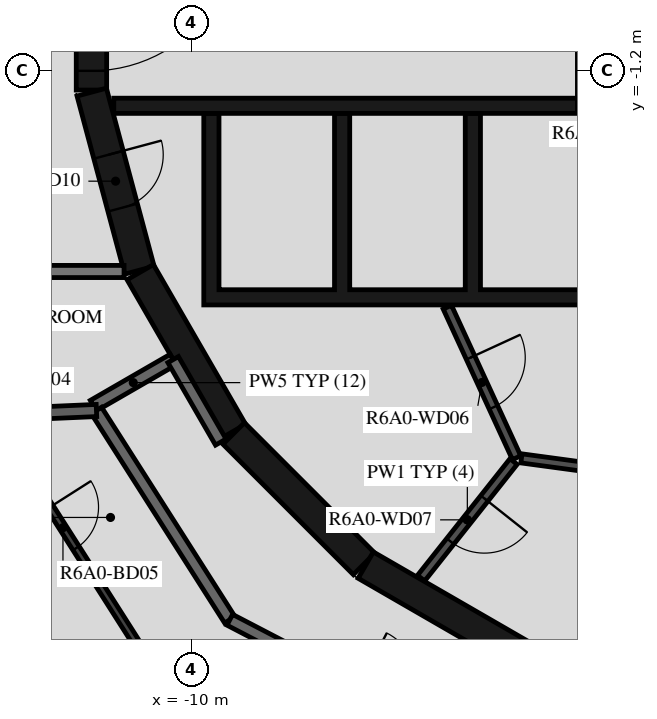
"""IFC4 building model, lengths in metres.
Left out: names, types, materials, properties, quantities, classifications, styles, units other than length and angle.
Written with IfcOpenShell. Run it as: python <this file> out.ifc"""

import sys

from ifc_helpers import new_model, si_unit, direction, frame, frame_2d, origin, place, context, subcontext, project, spatial, polyline, rectangle, outline, extrude, element, fill, save


model = new_model("IFC4")
c1 = context("Model", 3, precision=1e-05, world=origin(), true_north=direction((0.0, 1.0)))
c2 = subcontext(c1, "Body", "Model", "MODEL_VIEW")
j1 = project(units=[si_unit("LENGTHUNIT", "METRE"), si_unit("PLANEANGLEUNIT", "RADIAN")], contexts=[c1])
p1 = place(None, origin())
s1 = spatial("IfcSite", under=j1, at=p1, CompositionType="ELEMENT")
p2 = place(p1, origin())
s2 = spatial("IfcBuilding", under=s1, at=p2, CompositionType="ELEMENT")
p3 = place(p2, frame((0.0, 0.0, 226.7)))
s3 = spatial("IfcBuildingStorey", under=s2, at=p3, CompositionType="ELEMENT", Elevation=226.7)
p4 = place(p3, frame((-11.647, 1.516, 0.0), z_axis=(0.0, 0.0, 1.0), x_axis=(0.0, -1.0, 0.0)))
e1 = element("IfcWall", 1, at=p4, inside=s3, PredefinedType="SHEAR", context=c2, shape_type="SweptSolid", body=[
    extrude(rectangle(XDim=3.033, YDim=0.5, at=frame_2d((1.516, 0.0))), origin(), (0.0, 0.0, 1.0), 3.12),
])
p5 = place(p4, frame((0.316, 0.0, 0.0)))
e2 = element("IfcOpeningElement", 2, at=p5, cuts=e1, PredefinedType="OPENING", context=c2, shape_type="SweptSolid", body=[
    extrude(rectangle(XDim=2.4, YDim=2.1, at=frame_2d((1.2, 1.05))), frame((0.0, 0.26, 0.0), z_axis=(0.0, -1.0, 0.0), x_axis=(1.0, 0.0, 0.0)), (0.0, 0.0, 1.0), 0.52),
])
p6 = place(p3, frame((-11.643, -1.55, 0.0), z_axis=(0.0, 0.0, 1.0), x_axis=(0.258734743916, -0.965948410781, 0.0)))
e3 = element("IfcWall", 3, at=p6, inside=s3, PredefinedType="SHEAR", context=c2, shape_type="SweptSolid", body=[
    extrude(rectangle(XDim=3.033, YDim=0.5, at=frame_2d((1.516, 0.0))), origin(), (0.0, 0.0, 1.0), 3.12),
])
p7 = place(p6, frame((1.066, 0.0, 0.0)))
e4 = element("IfcOpeningElement", 4, at=p7, cuts=e3, PredefinedType="OPENING", context=c2, shape_type="SweptSolid", body=[
    extrude(rectangle(XDim=0.9, YDim=2.1, at=frame_2d((0.45, 1.05))), frame((0.0, 0.26, 0.0), z_axis=(0.0, -1.0, 0.0), x_axis=(1.0, 0.0, 0.0)), (0.0, 0.0, 1.0), 0.52),
])
p8 = place(p3, frame((-10.845, -4.51, 0.0), z_axis=(0.0, 0.0, 1.0), x_axis=(0.500087131594, -0.865975092491, 0.0)))
e5 = element("IfcWall", 5, at=p8, inside=s3, PredefinedType="SHEAR", context=c2, shape_type="SweptSolid", body=[
    extrude(rectangle(XDim=3.033, YDim=0.5, at=frame_2d((1.516, 0.0))), origin(), (0.0, 0.0, 1.0), 3.12),
])
p9 = place(p3, frame((-9.308, -7.164, 0.0), z_axis=(0.0, 0.0, 1.0), x_axis=(0.707106781187, -0.707106781187, 0.0)))
e6 = element("IfcWall", 6, at=p9, inside=s3, PredefinedType="SHEAR", context=c2, shape_type="SweptSolid", body=[
    extrude(rectangle(XDim=3.032, YDim=0.5, at=frame_2d((1.516, 0.0))), origin(), (0.0, 0.0, 1.0), 3.12),
])
p10 = place(p3, frame((-7.137, -9.329, 0.0), z_axis=(0.0, 0.0, 1.0), x_axis=(0.865975092491, -0.500087131594, 0.0)))
e7 = element("IfcWall", 7, at=p10, inside=s3, PredefinedType="SHEAR", context=c2, shape_type="SweptSolid", body=[
    extrude(rectangle(XDim=3.033, YDim=0.5, at=frame_2d((1.516, 0.0))), origin(), (0.0, 0.0, 1.0), 3.12),
])
p11 = place(p3, origin())
e8 = element("IfcWall", 8, at=p11, inside=s3, PredefinedType="SHEAR", context=c2, shape_type="SweptSolid", body=[
    extrude(outline(polyline([(9.8, -5.05), (9.8, -4.8), (9.8, -1.9), (9.55, -1.9), (9.55, -4.8), (7.65, -4.8), (7.65, -1.9), (7.4, -1.9), (7.4, -4.8), (5.5, -4.8), (5.5, -1.9), (5.25, -1.9), (5.25, -4.8), (3.35, -4.8), (3.35, -1.9), (3.1, -1.9), (3.1, -4.8), (1.2, -4.8), (1.2, -1.9), (0.95, -1.9), (0.95, -4.8), (-0.95, -4.8), (-0.95, -1.9), (-1.2, -1.9), (-1.2, -4.8), (-5.25, -4.8), (-5.25, -1.9), (-5.5, -1.9), (-5.5, -4.8), (-7.4, -4.8), (-7.4, -1.9), (-7.65, -1.9), (-7.65, -4.8), (-9.55, -4.8), (-9.55, -1.9), (-9.8, -1.9), (-9.8, -4.8), (-9.8, -5.05), (9.8, -5.05)])), origin(), (0.0, 0.0, 1.0), 3.12),
])
p12 = place(p3, frame((-11.28, -1.775, 0.0), z_axis=(0.0, 0.0, 1.0), x_axis=(1.0, 0.0, 0.0)))
e9 = element("IfcWall", 9, at=p12, inside=s3, PredefinedType="SHEAR", context=c2, shape_type="SweptSolid", body=[
    extrude(rectangle(XDim=14.38, YDim=0.25, at=frame_2d((7.19, 0.0))), origin(), (0.0, 0.0, 1.0), 3.12),
])
p13 = place(p12, frame((12.88, 0.0, 0.0)))
e10 = element("IfcOpeningElement", 10, at=p13, cuts=e9, PredefinedType="OPENING", context=c2, shape_type="SweptSolid", body=[
    extrude(rectangle(XDim=1.1, YDim=2.1, at=frame_2d((0.55, 1.05))), frame((0.0, 0.135, 0.0), z_axis=(0.0, -1.0, 0.0), x_axis=(1.0, 0.0, 0.0)), (0.0, 0.0, 1.0), 0.27),
])
p14 = place(p12, frame((7.605, 0.0, 0.0)))
e11 = element("IfcOpeningElement", 11, at=p14, cuts=e9, PredefinedType="OPENING", context=c2, shape_type="SweptSolid", body=[
    extrude(rectangle(XDim=0.9, YDim=2.1, at=frame_2d((0.45, 1.05))), frame((0.0, 0.135, 0.0), z_axis=(0.0, -1.0, 0.0), x_axis=(1.0, 0.0, 0.0)), (0.0, 0.0, 1.0), 0.27),
])
p15 = place(p12, frame((10.83, 0.0, 0.0)))
e12 = element("IfcOpeningElement", 12, at=p15, cuts=e9, PredefinedType="OPENING", context=c2, shape_type="SweptSolid", body=[
    extrude(rectangle(XDim=0.9, YDim=2.1, at=frame_2d((0.45, 1.05))), frame((0.0, 0.135, 0.0), z_axis=(0.0, -1.0, 0.0), x_axis=(1.0, 0.0, 0.0)), (0.0, 0.0, 1.0), 0.27),
])
p16 = place(p3, frame((-5.795, -5.086, 0.0), z_axis=(0.0, 0.0, 1.0), x_axis=(0.417887867606, -0.908498613157, 0.0)))
e13 = element("IfcWall", 13, at=p16, inside=s3, PredefinedType="PARTITIONING", context=c2, shape_type="SweptSolid", body=[
    extrude(rectangle(XDim=2.726, YDim=0.15, at=frame_2d((1.363, 0.0))), origin(), (0.0, 0.0, 1.0), 3.12),
])
p17 = place(p16, frame((0.913, 0.0, 0.0)))
e14 = element("IfcOpeningElement", 14, at=p17, cuts=e13, PredefinedType="OPENING", context=c2, shape_type="SweptSolid", body=[
    extrude(rectangle(XDim=0.9, YDim=2.1, at=frame_2d((0.45, 1.05))), frame((0.0, 0.085, 0.0), z_axis=(0.0, -1.0, 0.0), x_axis=(1.0, 0.0, 0.0)), (0.0, 0.0, 1.0), 0.17),
])
p18 = place(p3, frame((-4.706, -7.625, 0.0), z_axis=(0.0, 0.0, 1.0), x_axis=(-0.621392599334, -0.783499353856, 0.0)))
e15 = element("IfcWall", 15, at=p18, inside=s3, PredefinedType="PARTITIONING", context=c2, shape_type="SweptSolid", body=[
    extrude(rectangle(XDim=2.447, YDim=0.15, at=frame_2d((1.224, 0.0))), origin(), (0.0, 0.0, 1.0), 3.12),
])
p19 = place(p18, frame((0.774, 0.0, 0.0)))
e16 = element("IfcOpeningElement", 16, at=p19, cuts=e15, PredefinedType="OPENING", context=c2, shape_type="SweptSolid", body=[
    extrude(rectangle(XDim=0.9, YDim=2.1, at=frame_2d((0.45, 1.05))), frame((0.0, 0.085, 0.0), z_axis=(0.0, -1.0, 0.0), x_axis=(1.0, 0.0, 0.0)), (0.0, 0.0, 1.0), 0.17),
])
p20 = place(p3, frame((-2.42, -7.865, 0.0), z_axis=(0.0, 0.0, 1.0), x_axis=(-0.990972299108, 0.134066783362, 0.0)))
e17 = element("IfcWall", 17, at=p20, inside=s3, PredefinedType="PARTITIONING", context=c2, shape_type="SweptSolid", body=[
    extrude(rectangle(XDim=2.176, YDim=0.15, at=frame_2d((1.088, 0.0))), origin(), (0.0, 0.0, 1.0), 3.12),
])
p21 = place(p3, frame((-10.303, -5.949, 0.0), z_axis=(0.0, 0.0, 1.0), x_axis=(-0.866043382451, -0.499968858743, 0.0)))
e18 = element("IfcWall", 18, at=p21, inside=s3, PredefinedType="STANDARD", context=c2, shape_type="SweptSolid", body=[
    extrude(rectangle(XDim=1.515, YDim=0.2, at=frame_2d((0.758, 0.0))), origin(), (0.0, 0.0, 1.0), 3.12),
])
p22 = place(p3, frame((-9.52, -7.305, 0.0), z_axis=(0.0, 0.0, 1.0), x_axis=(-0.500028278809, 0.866009076391, 0.0)))
e19 = element("IfcWall", 19, at=p22, inside=s3, PredefinedType="STANDARD", context=c2, shape_type="SweptSolid", body=[
    extrude(rectangle(XDim=1.566, YDim=0.2, at=frame_2d((0.783, 0.0))), origin(), (0.0, 0.0, 1.0), 3.12),
])
p23 = place(p3, frame((-11.565, -6.786, 0.0), z_axis=(0.0, 0.0, 1.0), x_axis=(0.537297327359, -0.843392898958, 0.0)))
e20 = element("IfcWall", 20, at=p23, inside=s3, PredefinedType="STANDARD", context=c2, shape_type="SweptSolid", body=[
    extrude(rectangle(XDim=4.081, YDim=0.2, at=frame_2d((2.041, 0.0))), origin(), (0.0, 0.0, 1.0), 3.12),
])
p24 = place(p3, frame((-9.372, -10.228, 0.0), z_axis=(0.0, 0.0, 1.0), x_axis=(0.887005184532, -0.461759464021, 0.0)))
e21 = element("IfcWall", 21, at=p24, inside=s3, PredefinedType="STANDARD", context=c2, shape_type="SweptSolid", body=[
    extrude(rectangle(XDim=7.181, YDim=0.2, at=frame_2d((3.591, 0.0))), origin(), (0.0, 0.0, 1.0), 3.12),
])
p25 = place(p24, frame((2.391, 0.0, 0.0)))
e22 = element("IfcOpeningElement", 22, at=p25, cuts=e21, PredefinedType="OPENING", context=c2, shape_type="SweptSolid", body=[
    extrude(rectangle(XDim=1.0, YDim=2.1, at=frame_2d((0.5, 1.05))), frame((0.0, 0.11, 0.0), z_axis=(0.0, -1.0, 0.0), x_axis=(1.0, 0.0, 0.0)), (0.0, 0.0, 1.0), 0.22),
])
p26 = place(p3, frame((-17.655, -4.5, 0.0), z_axis=(0.0, 0.0, 1.0), x_axis=(1.0, 0.0, 0.0)))
e23 = element("IfcWall", 23, at=p26, inside=s3, PredefinedType="STANDARD", context=c2, shape_type="SweptSolid", body=[
    extrude(rectangle(XDim=6.543, YDim=0.2, at=frame_2d((3.272, 0.0))), origin(), (0.0, 0.0, 1.0), 3.12),
])
p27 = place(p3, frame((-13.148, -6.855, 0.0), z_axis=(0.0, 0.0, 1.0), x_axis=(0.999048583464, 0.043611098121, 0.0)))
e24 = element("IfcWall", 24, at=p27, inside=s3, PredefinedType="STANDARD", context=c2, shape_type="SweptSolid", body=[
    extrude(rectangle(XDim=1.584, YDim=0.2, at=frame_2d((0.792, 0.0))), origin(), (0.0, 0.0, 1.0), 3.12),
])
p28 = place(p3, frame((-13.137, -7.111, 0.0), z_axis=(0.0, 0.0, 1.0), x_axis=(0.537300549444, -0.843390846267, 0.0)))
e25 = element("IfcWall", 25, at=p28, inside=s3, PredefinedType="PARTITIONING", context=c2, shape_type="SweptSolid", body=[
    extrude(rectangle(XDim=5.054, YDim=0.12, at=frame_2d((2.527, 0.0))), origin(), (0.0, 0.0, 1.0), 3.12),
])
p29 = place(p28, frame((1.5, 0.0, 0.0)))
e26 = element("IfcOpeningElement", 26, at=p29, cuts=e25, PredefinedType="OPENING", context=c2, shape_type="SweptSolid", body=[
    extrude(rectangle(XDim=0.8, YDim=2.1, at=frame_2d((0.4, 1.05))), frame((0.0, 0.07, 0.0), z_axis=(0.0, -1.0, 0.0), x_axis=(1.0, 0.0, 0.0)), (0.0, 0.0, 1.0), 0.14),
])
p30 = place(p5, origin())
e27 = element("IfcDoor", 27, at=p30, inside=s3, OperationType="DOUBLE_DOOR_SINGLE_SWING", PredefinedType="DOOR", context=c2, shape_type="SweptSolid", body=[
    extrude(rectangle(XDim=2.4, YDim=2.1, at=frame_2d((1.2, 1.05))), frame((0.0, 0.025, 0.0), z_axis=(0.0, -1.0, 0.0), x_axis=(1.0, 0.0, 0.0)), (0.0, 0.0, 1.0), 0.05),
])
fill(e2, e27)
p31 = place(p14, origin())
e28 = element("IfcDoor", 28, at=p31, inside=s3, OperationType="SINGLE_SWING_RIGHT", PredefinedType="DOOR", context=c2, shape_type="SweptSolid", body=[
    extrude(rectangle(XDim=0.9, YDim=2.1, at=frame_2d((0.45, 1.05))), frame((0.0, 0.025, 0.0), z_axis=(0.0, -1.0, 0.0), x_axis=(1.0, 0.0, 0.0)), (0.0, 0.0, 1.0), 0.05),
])
fill(e11, e28)
p32 = place(p17, origin())
e29 = element("IfcDoor", 29, at=p32, inside=s3, OperationType="SINGLE_SWING_RIGHT", PredefinedType="DOOR", context=c2, shape_type="SweptSolid", body=[
    extrude(rectangle(XDim=0.9, YDim=2.1, at=frame_2d((0.45, 1.05))), frame((0.0, 0.025, 0.0), z_axis=(0.0, -1.0, 0.0), x_axis=(1.0, 0.0, 0.0)), (0.0, 0.0, 1.0), 0.05),
])
fill(e14, e29)
p33 = place(p19, origin())
e30 = element("IfcDoor", 30, at=p33, inside=s3, OperationType="SINGLE_SWING_LEFT", PredefinedType="DOOR", context=c2, shape_type="SweptSolid", body=[
    extrude(rectangle(XDim=0.9, YDim=2.1, at=frame_2d((0.45, 1.05))), frame((0.0, 0.025, 0.0), z_axis=(0.0, -1.0, 0.0), x_axis=(1.0, 0.0, 0.0)), (0.0, 0.0, 1.0), 0.05),
])
fill(e16, e30)
p34 = place(p7, origin())
e31 = element("IfcDoor", 31, at=p34, inside=s3, OperationType="SINGLE_SWING_RIGHT", PredefinedType="DOOR", context=c2, shape_type="SweptSolid", body=[
    extrude(rectangle(XDim=0.9, YDim=2.1, at=frame_2d((0.45, 1.05))), frame((0.0, 0.025, 0.0), z_axis=(0.0, -1.0, 0.0), x_axis=(1.0, 0.0, 0.0)), (0.0, 0.0, 1.0), 0.05),
])
fill(e4, e31)
p35 = place(p29, origin())
e32 = element("IfcDoor", 32, at=p35, inside=s3, OperationType="SINGLE_SWING_RIGHT", PredefinedType="DOOR", context=c2, shape_type="SweptSolid", body=[
    extrude(rectangle(XDim=0.8, YDim=2.1, at=frame_2d((0.4, 1.05))), frame((0.0, 0.025, 0.0), z_axis=(0.0, -1.0, 0.0), x_axis=(1.0, 0.0, 0.0)), (0.0, 0.0, 1.0), 0.05),
])
fill(e26, e32)
save(model, sys.argv[1])
